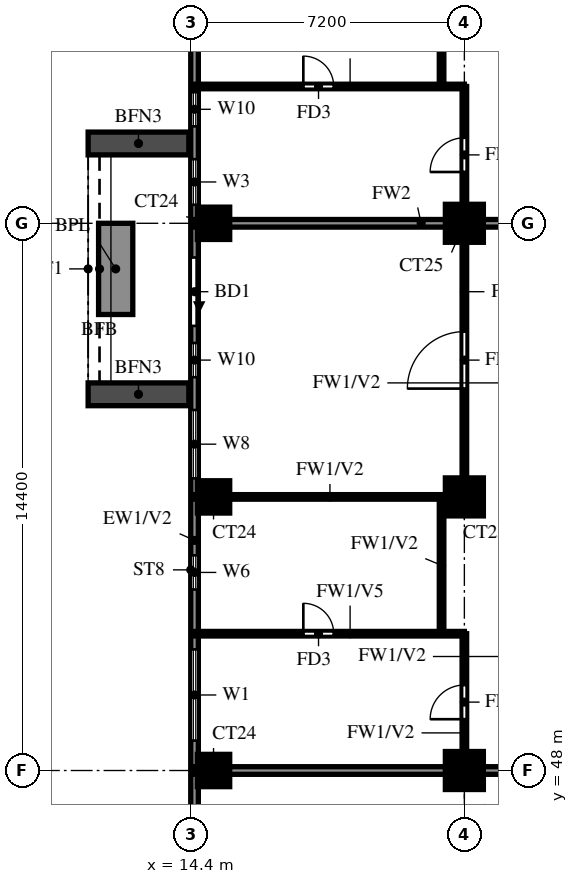
"""IFC4 building model, lengths in metres.
Left out: names, types, materials, properties, quantities, classifications, styles, units other than length and angle.
Written with IfcOpenShell. Run it as: python <this file> out.ifc"""

import sys

from ifc_helpers import new_model, si_unit, direction, frame, frame_2d, origin, origin_2d, place, context, subcontext, project, spatial, rectangle, extrude, source, transform, mapped, element, fill, save


model = new_model("IFC4")
c1 = context("Model", 3, precision=1e-05, world=origin(), true_north=direction((0.0, 1.0)))
c2 = subcontext(c1, "Body", "Model", "MODEL_VIEW")
j1 = project(units=[si_unit("LENGTHUNIT", "METRE"), si_unit("PLANEANGLEUNIT", "RADIAN")], contexts=[c1])
p1 = place(None, origin())
s1 = spatial("IfcSite", under=j1, at=p1, CompositionType="ELEMENT")
p2 = place(p1, origin())
s2 = spatial("IfcBuilding", under=s1, at=p2, CompositionType="ELEMENT")
p3 = place(p2, frame((0.0, 0.0, 167.5)))
s3 = spatial("IfcBuildingStorey", under=s2, at=p3, CompositionType="ELEMENT", Elevation=167.5)
m1 = source(origin(), c2, "Body", "SweptSolid", [
    extrude(rectangle(XDim=0.85, YDim=0.85, at=origin_2d()), origin(), (0.0, 0.0, 1.0), 3.2),
])
p4 = place(p3, frame((15.0, 48.0, 0.0), z_axis=(0.0, 0.0, 1.0), x_axis=(1.0, 0.0, 0.0)))
e1 = element("IfcColumn", 1, at=p4, inside=s3, PredefinedType="COLUMN", context=c2, shape_type="MappedRepresentation", body=[
    mapped(m1, transform((0.0, 0.0, 0.0))),
])
m2 = source(origin(), c2, "Body", "SweptSolid", [
    extrude(rectangle(XDim=1.0, YDim=1.0, at=origin_2d()), origin(), (0.0, 0.0, 1.0), 3.2),
])
p5 = place(p3, frame((21.6, 48.0, 0.0), z_axis=(0.0, 0.0, 1.0), x_axis=(1.0, 0.0, 0.0)))
e2 = element("IfcColumn", 2, at=p5, inside=s3, PredefinedType="COLUMN", context=c2, shape_type="MappedRepresentation", body=[
    mapped(m2, transform((0.0, 0.0, 0.0))),
])
p6 = place(p3, frame((15.0, 55.2, 0.0), z_axis=(0.0, 0.0, 1.0), x_axis=(1.0, 0.0, 0.0)))
e3 = element("IfcColumn", 3, at=p6, inside=s3, PredefinedType="COLUMN", context=c2, shape_type="MappedRepresentation", body=[
    mapped(m1, transform((0.0, 0.0, 0.0))),
])
p7 = place(p3, frame((21.6, 55.2, 0.0), z_axis=(0.0, 0.0, 1.0), x_axis=(1.0, 0.0, 0.0)))
e4 = element("IfcColumn", 4, at=p7, inside=s3, PredefinedType="COLUMN", context=c2, shape_type="MappedRepresentation", body=[
    mapped(m2, transform((0.0, 0.0, 0.0))),
])
p8 = place(p3, frame((15.0, 62.4, 0.0), z_axis=(0.0, 0.0, 1.0), x_axis=(1.0, 0.0, 0.0)))
e5 = element("IfcColumn", 5, at=p8, inside=s3, PredefinedType="COLUMN", context=c2, shape_type="MappedRepresentation", body=[
    mapped(m1, transform((0.0, 0.0, 0.0))),
])
p9 = place(p3, frame((21.6, 62.4, 0.0), z_axis=(0.0, 0.0, 1.0), x_axis=(1.0, 0.0, 0.0)))
e6 = element("IfcColumn", 6, at=p9, inside=s3, PredefinedType="COLUMN", context=c2, shape_type="MappedRepresentation", body=[
    mapped(m2, transform((0.0, 0.0, 0.0))),
])
p10 = place(p3, frame((14.5, 76.6, 0.0), z_axis=(0.0, 0.0, 1.0), x_axis=(0.0, -1.0, 0.0)))
e7 = element("IfcWall", 7, at=p10, inside=s3, PredefinedType="SOLIDWALL", context=c2, shape_type="SweptSolid", body=[
    extrude(rectangle(XDim=33.4, YDim=0.2, at=frame_2d((16.7, 0.0))), origin(), (0.0, 0.0, 1.0), 3.2),
])
p11 = place(p10, frame((15.1, 0.0, 0.0)))
e8 = element("IfcOpeningElement", 8, at=p11, cuts=e7, PredefinedType="OPENING", context=c2, shape_type="SweptSolid", body=[
    extrude(rectangle(XDim=1.8, YDim=2.4, at=frame_2d((0.9, 1.2))), frame((0.0, 0.11, 0.0), z_axis=(0.0, -1.0, 0.0), x_axis=(1.0, 0.0, 0.0)), (0.0, 0.0, 1.0), 0.22),
])
p12 = place(p10, frame((29.887, 0.0, 0.6)))
e9 = element("IfcOpeningElement", 9, at=p12, cuts=e7, PredefinedType="OPENING", context=c2, shape_type="SweptSolid", body=[
    extrude(rectangle(XDim=2.4, YDim=2.4, at=frame_2d((1.2, 1.2))), frame((0.0, 0.11, 0.0), z_axis=(0.0, -1.0, 0.0), x_axis=(1.0, 0.0, 0.0)), (0.0, 0.0, 1.0), 0.22),
])
p13 = place(p10, frame((25.413, 0.0, 0.6)))
e10 = element("IfcOpeningElement", 10, at=p13, cuts=e7, PredefinedType="OPENING", context=c2, shape_type="SweptSolid", body=[
    extrude(rectangle(XDim=2.4, YDim=2.4, at=frame_2d((1.2, 1.2))), frame((0.0, 0.11, 0.0), z_axis=(0.0, -1.0, 0.0), x_axis=(1.0, 0.0, 0.0)), (0.0, 0.0, 1.0), 0.22),
])
p14 = place(p10, frame((22.938, 0.0, 1.5)))
e11 = element("IfcOpeningElement", 11, at=p14, cuts=e7, PredefinedType="OPENING", context=c2, shape_type="SweptSolid", body=[
    extrude(rectangle(XDim=0.9, YDim=0.9, at=frame_2d((0.45, 0.45))), frame((0.0, 0.11, 0.0), z_axis=(0.0, -1.0, 0.0), x_axis=(1.0, 0.0, 0.0)), (0.0, 0.0, 1.0), 0.22),
])
p15 = place(p10, frame((17.35, 0.0, 0.6)))
e12 = element("IfcOpeningElement", 12, at=p15, cuts=e7, PredefinedType="OPENING", context=c2, shape_type="SweptSolid", body=[
    extrude(rectangle(XDim=0.9, YDim=2.4, at=frame_2d((0.45, 1.2))), frame((0.0, 0.11, 0.0), z_axis=(0.0, -1.0, 0.0), x_axis=(1.0, 0.0, 0.0)), (0.0, 0.0, 1.0), 0.22),
])
p16 = place(p10, frame((19.113, 0.0, 0.6)))
e13 = element("IfcOpeningElement", 13, at=p16, cuts=e7, PredefinedType="OPENING", context=c2, shape_type="SweptSolid", body=[
    extrude(rectangle(XDim=1.8, YDim=2.4, at=frame_2d((0.9, 1.2))), frame((0.0, 0.11, 0.0), z_axis=(0.0, -1.0, 0.0), x_axis=(1.0, 0.0, 0.0)), (0.0, 0.0, 1.0), 0.22),
])
p17 = place(p10, frame((10.75, 0.0, 0.6)))
e14 = element("IfcOpeningElement", 14, at=p17, cuts=e7, PredefinedType="OPENING", context=c2, shape_type="SweptSolid", body=[
    extrude(rectangle(XDim=0.9, YDim=2.4, at=frame_2d((0.45, 1.2))), frame((0.0, 0.11, 0.0), z_axis=(0.0, -1.0, 0.0), x_axis=(1.0, 0.0, 0.0)), (0.0, 0.0, 1.0), 0.22),
])
p18 = place(p10, frame((12.512, 0.0, 0.6)))
e15 = element("IfcOpeningElement", 15, at=p18, cuts=e7, PredefinedType="OPENING", context=c2, shape_type="SweptSolid", body=[
    extrude(rectangle(XDim=1.2, YDim=2.4, at=frame_2d((0.6, 1.2))), frame((0.0, 0.11, 0.0), z_axis=(0.0, -1.0, 0.0), x_axis=(1.0, 0.0, 0.0)), (0.0, 0.0, 1.0), 0.22),
])
p19 = place(p10, frame((8.538, 0.0, 1.5)))
e16 = element("IfcOpeningElement", 16, at=p19, cuts=e7, PredefinedType="OPENING", context=c2, shape_type="SweptSolid", body=[
    extrude(rectangle(XDim=0.9, YDim=0.9, at=frame_2d((0.45, 0.45))), frame((0.0, 0.11, 0.0), z_axis=(0.0, -1.0, 0.0), x_axis=(1.0, 0.0, 0.0)), (0.0, 0.0, 1.0), 0.22),
])
p20 = place(p10, frame((3.812, 0.0, 0.6)))
e17 = element("IfcOpeningElement", 17, at=p20, cuts=e7, PredefinedType="OPENING", context=c2, shape_type="SweptSolid", body=[
    extrude(rectangle(XDim=2.4, YDim=2.4, at=frame_2d((1.2, 1.2))), frame((0.0, 0.11, 0.0), z_axis=(0.0, -1.0, 0.0), x_axis=(1.0, 0.0, 0.0)), (0.0, 0.0, 1.0), 0.22),
])
p21 = place(p10, frame((0.6, 0.0, 0.6)))
e18 = element("IfcOpeningElement", 18, at=p21, cuts=e7, PredefinedType="OPENING", context=c2, shape_type="SweptSolid", body=[
    extrude(rectangle(XDim=2.4, YDim=2.4, at=frame_2d((1.2, 1.2))), frame((0.0, 0.11, 0.0), z_axis=(0.0, -1.0, 0.0), x_axis=(1.0, 0.0, 0.0)), (0.0, 0.0, 1.0), 0.22),
])
for number, where, z_axis, x_axis in (
    (19, (14.35, 64.5, 0.0), (0.0, 0.0, 1.0), (-1.0, 0.0, 0.0)),
    (20, (14.35, 57.9, 0.0), (0.0, 0.0, 1.0), (-1.0, 0.0, 0.0)),
):
    element("IfcWall", number, at=place(p3, frame(where, z_axis=z_axis, x_axis=x_axis)), inside=s3, PredefinedType="SOLIDWALL", context=c2, shape_type="SweptSolid", body=[
        extrude(rectangle(XDim=2.65, YDim=0.6, at=frame_2d((1.325, 0.0))), origin(), (0.0, 0.0, 1.0), 2.85),
    ])
p22 = place(p3, frame((12.425, 62.4, 0.0), z_axis=(0.0, 0.0, 1.0), x_axis=(0.0, -1.0, 0.0)))
e21 = element("IfcWall", 21, at=p22, inside=s3, PredefinedType="SOLIDWALL", context=c2, shape_type="SweptSolid", body=[
    extrude(rectangle(XDim=2.4, YDim=0.9, at=frame_2d((1.2, 0.0))), origin(), (0.0, 0.0, 1.0), 0.9),
])
p23 = place(p3, frame((14.525, 48.0, 0.0), z_axis=(0.0, 0.0, 1.0), x_axis=(1.0, 0.0, 0.0)))
e22 = element("IfcWall", 22, at=p23, inside=s3, PredefinedType="SOLIDWALL", context=c2, shape_type="SweptSolid", body=[
    extrude(rectangle(XDim=19.075, YDim=0.2, at=frame_2d((9.538, 0.0))), origin(), (0.0, 0.0, 1.0), 3.2),
])
p24 = place(p3, frame((14.525, 62.4, 0.0), z_axis=(0.0, 0.0, 1.0), x_axis=(1.0, 0.0, 0.0)))
e23 = element("IfcWall", 23, at=p24, inside=s3, PredefinedType="SOLIDWALL", context=c2, shape_type="SweptSolid", body=[
    extrude(rectangle(XDim=11.875, YDim=0.2, at=frame_2d((5.938, 0.0))), origin(), (0.0, 0.0, 1.0), 3.2),
])
p25 = place(p3, frame((14.525, 51.6, 0.0), z_axis=(0.0, 0.0, 1.0), x_axis=(1.0, 0.0, 0.0)))
e24 = element("IfcWall", 24, at=p25, inside=s3, PredefinedType="PARTITIONING", context=c2, shape_type="SweptSolid", body=[
    extrude(rectangle(XDim=7.075, YDim=0.12, at=frame_2d((3.538, 0.0))), origin(), (0.0, 0.0, 1.0), 2.3),
])
p26 = place(p25, frame((2.837, 0.0, 0.0)))
e25 = element("IfcOpeningElement", 25, at=p26, cuts=e24, PredefinedType="OPENING", context=c2, shape_type="SweptSolid", body=[
    extrude(rectangle(XDim=0.8, YDim=2.1, at=frame_2d((0.4, 1.05))), frame((0.0, 0.07, 0.0), z_axis=(0.0, -1.0, 0.0), x_axis=(1.0, 0.0, 0.0)), (0.0, 0.0, 1.0), 0.14),
])
p27 = place(p3, frame((14.525, 55.2, 0.0), z_axis=(0.0, 0.0, 1.0), x_axis=(1.0, 0.0, 0.0)))
e26 = element("IfcWall", 26, at=p27, inside=s3, PredefinedType="PARTITIONING", context=c2, shape_type="SweptSolid", body=[
    extrude(rectangle(XDim=7.075, YDim=0.12, at=frame_2d((3.538, 0.0))), origin(), (0.0, 0.0, 1.0), 3.2),
])
p28 = place(p3, frame((14.525, 66.0, 0.0), z_axis=(0.0, 0.0, 1.0), x_axis=(1.0, 0.0, 0.0)))
e27 = element("IfcWall", 27, at=p28, inside=s3, PredefinedType="PARTITIONING", context=c2, shape_type="SweptSolid", body=[
    extrude(rectangle(XDim=7.075, YDim=0.12, at=frame_2d((3.538, 0.0))), origin(), (0.0, 0.0, 1.0), 2.3),
])
p29 = place(p28, frame((2.837, 0.0, 0.0)))
e28 = element("IfcOpeningElement", 28, at=p29, cuts=e27, PredefinedType="OPENING", context=c2, shape_type="SweptSolid", body=[
    extrude(rectangle(XDim=0.8, YDim=2.1, at=frame_2d((0.4, 1.05))), frame((0.0, 0.07, 0.0), z_axis=(0.0, -1.0, 0.0), x_axis=(1.0, 0.0, 0.0)), (0.0, 0.0, 1.0), 0.14),
])
p30 = place(p3, frame((21.0, 51.6, 0.0), z_axis=(0.0, 0.0, 1.0), x_axis=(0.0, 1.0, 0.0)))
e29 = element("IfcWall", 29, at=p30, inside=s3, PredefinedType="PARTITIONING", context=c2, shape_type="SweptSolid", body=[
    extrude(rectangle(XDim=3.6, YDim=0.12, at=frame_2d((1.8, 0.0))), origin(), (0.0, 0.0, 1.0), 3.2),
])
p31 = place(p3, frame((21.0, 66.0, 0.0), z_axis=(0.0, 0.0, 1.0), x_axis=(0.0, 1.0, 0.0)))
e30 = element("IfcWall", 30, at=p31, inside=s3, PredefinedType="PARTITIONING", context=c2, shape_type="SweptSolid", body=[
    extrude(rectangle(XDim=3.6, YDim=0.12, at=frame_2d((1.8, 0.0))), origin(), (0.0, 0.0, 1.0), 3.2),
])
p32 = place(p3, frame((21.6, 48.0, 0.0), z_axis=(0.0, 0.0, 1.0), x_axis=(0.0, 1.0, 0.0)))
e31 = element("IfcWall", 31, at=p32, inside=s3, PredefinedType="PARTITIONING", context=c2, shape_type="SweptSolid", body=[
    extrude(rectangle(XDim=3.6, YDim=0.12, at=frame_2d((1.8, 0.0))), origin(), (0.0, 0.0, 1.0), 3.2),
])
p33 = place(p32, frame((1.35, 0.0, 0.0)))
e32 = element("IfcOpeningElement", 32, at=p33, cuts=e31, PredefinedType="OPENING", context=c2, shape_type="SweptSolid", body=[
    extrude(rectangle(XDim=0.9, YDim=2.1, at=frame_2d((0.45, 1.05))), frame((0.0, 0.07, 0.0), z_axis=(0.0, -1.0, 0.0), x_axis=(1.0, 0.0, 0.0)), (0.0, 0.0, 1.0), 0.14),
])
p34 = place(p3, frame((21.6, 55.2, 0.0), z_axis=(0.0, 0.0, 1.0), x_axis=(0.0, 1.0, 0.0)))
e33 = element("IfcWall", 33, at=p34, inside=s3, PredefinedType="PARTITIONING", context=c2, shape_type="SweptSolid", body=[
    extrude(rectangle(XDim=10.8, YDim=0.12, at=frame_2d((5.4, 0.0))), origin(), (0.0, 0.0, 1.0), 3.2),
])
p35 = place(p34, frame((2.85, 0.0, 0.0)))
e34 = element("IfcOpeningElement", 34, at=p35, cuts=e33, PredefinedType="OPENING", context=c2, shape_type="SweptSolid", body=[
    extrude(rectangle(XDim=1.5, YDim=2.1, at=frame_2d((0.75, 1.05))), frame((0.0, 0.07, 0.0), z_axis=(0.0, -1.0, 0.0), x_axis=(1.0, 0.0, 0.0)), (0.0, 0.0, 1.0), 0.14),
])
p36 = place(p34, frame((8.55, 0.0, 0.0)))
e35 = element("IfcOpeningElement", 35, at=p36, cuts=e33, PredefinedType="OPENING", context=c2, shape_type="SweptSolid", body=[
    extrude(rectangle(XDim=0.9, YDim=2.1, at=frame_2d((0.45, 1.05))), frame((0.0, 0.07, 0.0), z_axis=(0.0, -1.0, 0.0), x_axis=(1.0, 0.0, 0.0)), (0.0, 0.0, 1.0), 0.14),
])
p37 = place(p11, origin())
e36 = element("IfcDoor", 36, at=p37, inside=s3, OperationType="DOUBLE_DOOR_SLIDING", PredefinedType="DOOR", context=c2, shape_type="SweptSolid", body=[
    extrude(rectangle(XDim=1.8, YDim=2.4, at=frame_2d((0.9, 1.2))), frame((0.0, 0.025, 0.0), z_axis=(0.0, -1.0, 0.0), x_axis=(1.0, 0.0, 0.0)), (0.0, 0.0, 1.0), 0.05),
])
fill(e8, e36)
p38 = place(p13, origin())
e37 = element("IfcWindow", 37, at=p38, inside=s3, PartitioningType="DOUBLE_PANEL_VERTICAL", PredefinedType="WINDOW", context=c2, shape_type="SweptSolid", body=[
    extrude(rectangle(XDim=2.4, YDim=2.4, at=frame_2d((1.2, 1.2))), frame((0.0, 0.03, 0.0), z_axis=(0.0, -1.0, 0.0), x_axis=(1.0, 0.0, 0.0)), (0.0, 0.0, 1.0), 0.06),
])
fill(e10, e37)
p39 = place(p14, origin())
e38 = element("IfcWindow", 38, at=p39, inside=s3, PartitioningType="SINGLE_PANEL", PredefinedType="WINDOW", context=c2, shape_type="SweptSolid", body=[
    extrude(rectangle(XDim=0.9, YDim=0.9, at=frame_2d((0.45, 0.45))), frame((0.0, 0.03, 0.0), z_axis=(0.0, -1.0, 0.0), x_axis=(1.0, 0.0, 0.0)), (0.0, 0.0, 1.0), 0.06),
])
fill(e11, e38)
p40 = place(p15, origin())
e39 = element("IfcWindow", 39, at=p40, inside=s3, PartitioningType="SINGLE_PANEL", PredefinedType="WINDOW", context=c2, shape_type="SweptSolid", body=[
    extrude(rectangle(XDim=0.9, YDim=2.4, at=frame_2d((0.45, 1.2))), frame((0.0, 0.03, 0.0), z_axis=(0.0, -1.0, 0.0), x_axis=(1.0, 0.0, 0.0)), (0.0, 0.0, 1.0), 0.06),
])
fill(e12, e39)
p41 = place(p16, origin())
e40 = element("IfcWindow", 40, at=p41, inside=s3, PartitioningType="DOUBLE_PANEL_VERTICAL", PredefinedType="WINDOW", context=c2, shape_type="SweptSolid", body=[
    extrude(rectangle(XDim=1.8, YDim=2.4, at=frame_2d((0.9, 1.2))), frame((0.0, 0.03, 0.0), z_axis=(0.0, -1.0, 0.0), x_axis=(1.0, 0.0, 0.0)), (0.0, 0.0, 1.0), 0.06),
])
fill(e13, e40)
p42 = place(p17, origin())
e41 = element("IfcWindow", 41, at=p42, inside=s3, PartitioningType="SINGLE_PANEL", PredefinedType="WINDOW", context=c2, shape_type="SweptSolid", body=[
    extrude(rectangle(XDim=0.9, YDim=2.4, at=frame_2d((0.45, 1.2))), frame((0.0, 0.03, 0.0), z_axis=(0.0, -1.0, 0.0), x_axis=(1.0, 0.0, 0.0)), (0.0, 0.0, 1.0), 0.06),
])
fill(e14, e41)
p43 = place(p18, origin())
e42 = element("IfcWindow", 42, at=p43, inside=s3, PartitioningType="SINGLE_PANEL", PredefinedType="WINDOW", context=c2, shape_type="SweptSolid", body=[
    extrude(rectangle(XDim=1.2, YDim=2.4, at=frame_2d((0.6, 1.2))), frame((0.0, 0.03, 0.0), z_axis=(0.0, -1.0, 0.0), x_axis=(1.0, 0.0, 0.0)), (0.0, 0.0, 1.0), 0.06),
])
fill(e15, e42)
p44 = place(p33, origin())
e43 = element("IfcDoor", 43, at=p44, inside=s3, OperationType="SINGLE_SWING_LEFT", PredefinedType="DOOR", context=c2, shape_type="SweptSolid", body=[
    extrude(rectangle(XDim=0.9, YDim=2.1, at=frame_2d((0.45, 1.05))), frame((0.0, 0.025, 0.0), z_axis=(0.0, -1.0, 0.0), x_axis=(1.0, 0.0, 0.0)), (0.0, 0.0, 1.0), 0.05),
])
fill(e32, e43)
p45 = place(p26, origin())
e44 = element("IfcDoor", 44, at=p45, inside=s3, OperationType="SINGLE_SWING_LEFT", PredefinedType="DOOR", context=c2, shape_type="SweptSolid", body=[
    extrude(rectangle(XDim=0.8, YDim=2.1, at=frame_2d((0.4, 1.05))), frame((0.0, 0.025, 0.0), z_axis=(0.0, -1.0, 0.0), x_axis=(1.0, 0.0, 0.0)), (0.0, 0.0, 1.0), 0.05),
])
fill(e25, e44)
p46 = place(p35, origin())
e45 = element("IfcDoor", 45, at=p46, inside=s3, OperationType="SINGLE_SWING_RIGHT", PredefinedType="DOOR", context=c2, shape_type="SweptSolid", body=[
    extrude(rectangle(XDim=1.5, YDim=2.1, at=frame_2d((0.75, 1.05))), frame((0.0, 0.025, 0.0), z_axis=(0.0, -1.0, 0.0), x_axis=(1.0, 0.0, 0.0)), (0.0, 0.0, 1.0), 0.05),
])
fill(e34, e45)
p47 = place(p36, origin())
e46 = element("IfcDoor", 46, at=p47, inside=s3, OperationType="SINGLE_SWING_LEFT", PredefinedType="DOOR", context=c2, shape_type="SweptSolid", body=[
    extrude(rectangle(XDim=0.9, YDim=2.1, at=frame_2d((0.45, 1.05))), frame((0.0, 0.025, 0.0), z_axis=(0.0, -1.0, 0.0), x_axis=(1.0, 0.0, 0.0)), (0.0, 0.0, 1.0), 0.05),
])
fill(e35, e46)
p48 = place(p29, origin())
e47 = element("IfcDoor", 47, at=p48, inside=s3, OperationType="SINGLE_SWING_LEFT", PredefinedType="DOOR", context=c2, shape_type="SweptSolid", body=[
    extrude(rectangle(XDim=0.8, YDim=2.1, at=frame_2d((0.4, 1.05))), frame((0.0, 0.025, 0.0), z_axis=(0.0, -1.0, 0.0), x_axis=(1.0, 0.0, 0.0)), (0.0, 0.0, 1.0), 0.05),
])
fill(e28, e47)
save(model, sys.argv[1])
